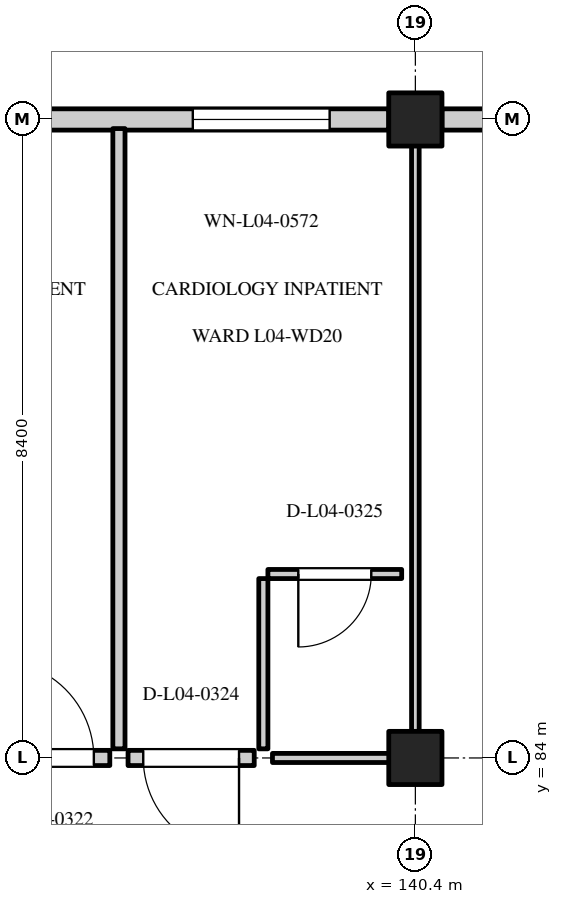
"""IFC4 building model, lengths in metres.
Left out: names, types, materials, properties, quantities, classifications, styles, units other than length and angle.
Written with IfcOpenShell. Run it as: python <this file> out.ifc"""

import sys

from ifc_helpers import new_model, si_unit, direction, frame, frame_2d, origin, origin_2d, place, context, subcontext, project, spatial, rectangle, extrude, element, fill, save


model = new_model("IFC4")
c1 = context("Model", 3, precision=1e-05, world=origin(), true_north=direction((0.0, 1.0)))
c2 = subcontext(c1, "Body", "Model", "MODEL_VIEW")
j1 = project(units=[si_unit("LENGTHUNIT", "METRE"), si_unit("PLANEANGLEUNIT", "RADIAN")], contexts=[c1])
p1 = place(None, origin())
s1 = spatial("IfcSite", under=j1, at=p1, CompositionType="ELEMENT")
p2 = place(p1, origin())
s2 = spatial("IfcBuilding", under=s1, at=p2, CompositionType="ELEMENT")
p3 = place(p2, frame((0.0, 0.0, 18.0)))
s3 = spatial("IfcBuildingStorey", under=s2, at=p3, CompositionType="ELEMENT", Elevation=18.0)
for number, where, z_axis, x_axis in (
    (1, (140.4, 84.0, 0.0), (0.0, 0.0, 1.0), (1.0, 0.0, 0.0)),
    (2, (140.4, 92.4, 0.0), (0.0, 0.0, 1.0), (1.0, 0.0, 0.0)),
):
    element("IfcColumn", number, at=place(p3, frame(where, z_axis=z_axis, x_axis=x_axis)), inside=s3, PredefinedType="COLUMN", context=c2, shape_type="SweptSolid", body=[
        extrude(rectangle(XDim=0.7, YDim=0.7, at=origin_2d()), origin(), (0.0, 0.0, 1.0), 4.2),
    ])
p4 = place(p3, frame((132.95, 92.4, 0.0), z_axis=(0.0, 0.0, 1.0), x_axis=(1.0, 0.0, 0.0)))
e3 = element("IfcWall", 3, at=p4, inside=s3, PredefinedType="STANDARD", context=c2, shape_type="SweptSolid", body=[
    extrude(rectangle(XDim=7.1, YDim=0.28, at=frame_2d((3.55, 0.0))), origin(), (0.0, 0.0, 1.0), 3.335),
])
p5 = place(p4, frame((0.778, 0.0, 0.8)))
e4 = element("IfcOpeningElement", 4, at=p5, cuts=e3, PredefinedType="OPENING", context=c2, shape_type="SweptSolid", body=[
    extrude(rectangle(XDim=1.8, YDim=1.65, at=frame_2d((0.9, 0.825))), frame((0.0, 0.152, 0.0), z_axis=(0.0, -1.0, 0.0), x_axis=(1.0, 0.0, 0.0)), (0.0, 0.0, 1.0), 0.304),
])
p6 = place(p4, frame((4.522, 0.0, 0.8)))
e5 = element("IfcOpeningElement", 5, at=p6, cuts=e3, PredefinedType="OPENING", context=c2, shape_type="SweptSolid", body=[
    extrude(rectangle(XDim=1.8, YDim=1.65, at=frame_2d((0.9, 0.825))), frame((0.0, 0.152, 0.0), z_axis=(0.0, -1.0, 0.0), x_axis=(1.0, 0.0, 0.0)), (0.0, 0.0, 1.0), 0.304),
])
p7 = place(p3, frame((140.75, 92.4, 0.0), z_axis=(0.0, 0.0, 1.0), x_axis=(1.0, 0.0, 0.0)))
e6 = element("IfcWall", 6, at=p7, inside=s3, PredefinedType="STANDARD", context=c2, shape_type="SweptSolid", body=[
    extrude(rectangle(XDim=7.075, YDim=0.28, at=frame_2d((3.538, 0.0))), origin(), (0.0, 0.0, 1.0), 3.335),
])
p8 = place(p7, frame((0.778, 0.0, 0.8)))
e7 = element("IfcOpeningElement", 7, at=p8, cuts=e6, PredefinedType="OPENING", context=c2, shape_type="SweptSolid", body=[
    extrude(rectangle(XDim=1.8, YDim=1.55, at=frame_2d((0.9, 0.775))), frame((0.0, 0.152, 0.0), z_axis=(0.0, -1.0, 0.0), x_axis=(1.0, 0.0, 0.0)), (0.0, 0.0, 1.0), 0.304),
])
p9 = place(p7, frame((4.522, 0.0, 0.8)))
e8 = element("IfcOpeningElement", 8, at=p9, cuts=e6, PredefinedType="OPENING", context=c2, shape_type="SweptSolid", body=[
    extrude(rectangle(XDim=1.8, YDim=1.55, at=frame_2d((0.9, 0.775))), frame((0.0, 0.152, 0.0), z_axis=(0.0, -1.0, 0.0), x_axis=(1.0, 0.0, 0.0)), (0.0, 0.0, 1.0), 0.304),
])
p10 = place(p3, frame((136.5, 84.12, 0.0), z_axis=(0.0, 0.0, 1.0), x_axis=(0.0, 1.0, 0.0)))
e9 = element("IfcWall", 9, at=p10, inside=s3, PredefinedType="PARTITIONING", context=c2, shape_type="SweptSolid", body=[
    extrude(rectangle(XDim=8.16, YDim=0.16, at=frame_2d((4.08, 0.0))), origin(), (0.0, 0.0, 1.0), 3.865),
])
p11 = place(p3, frame((134.72, 84.0, 0.0), z_axis=(0.0, 0.0, 1.0), x_axis=(1.0, 0.0, 0.0)))
e10 = element("IfcWall", 10, at=p11, inside=s3, PredefinedType="STANDARD", context=c2, shape_type="SweptSolid", body=[
    extrude(rectangle(XDim=1.66, YDim=0.2, at=frame_2d((0.83, 0.0))), origin(), (0.0, 0.0, 1.0), 3.235),
])
p12 = place(p11, frame((0.17, 0.0, 0.0)))
e11 = element("IfcOpeningElement", 11, at=p12, cuts=e10, PredefinedType="OPENING", context=c2, shape_type="SweptSolid", body=[
    extrude(rectangle(XDim=1.28, YDim=2.15, at=frame_2d((0.64, 1.075))), frame((0.0, 0.112, 0.0), z_axis=(0.0, -1.0, 0.0), x_axis=(1.0, 0.0, 0.0)), (0.0, 0.0, 1.0), 0.224),
])
p13 = place(p3, frame((140.4, 84.12, 0.0), z_axis=(0.0, 0.0, 1.0), x_axis=(0.0, 1.0, 0.0)))
e12 = element("IfcWall", 12, at=p13, inside=s3, PredefinedType="PARTITIONING", context=c2, shape_type="SweptSolid", body=[
    extrude(rectangle(XDim=8.16, YDim=0.1, at=frame_2d((4.08, 0.0))), origin(), (0.0, 0.0, 1.0), 3.865),
])
p14 = place(p3, frame((136.62, 84.0, 0.0), z_axis=(0.0, 0.0, 1.0), x_axis=(1.0, 0.0, 0.0)))
e13 = element("IfcWall", 13, at=p14, inside=s3, PredefinedType="STANDARD", context=c2, shape_type="SweptSolid", body=[
    extrude(rectangle(XDim=1.66, YDim=0.2, at=frame_2d((0.83, 0.0))), origin(), (0.0, 0.0, 1.0), 3.235),
])
p15 = place(p14, frame((0.2, 0.0, 0.0)))
e14 = element("IfcOpeningElement", 14, at=p15, cuts=e13, PredefinedType="OPENING", context=c2, shape_type="SweptSolid", body=[
    extrude(rectangle(XDim=1.26, YDim=2.1, at=frame_2d((0.63, 1.05))), frame((0.0, 0.112, 0.0), z_axis=(0.0, -1.0, 0.0), x_axis=(1.0, 0.0, 0.0)), (0.0, 0.0, 1.0), 0.224),
])
p16 = place(p3, frame((138.52, 84.0, 0.0), z_axis=(0.0, 0.0, 1.0), x_axis=(1.0, 0.0, 0.0)))
e15 = element("IfcWall", 15, at=p16, inside=s3, PredefinedType="PARTITIONING", context=c2, shape_type="SweptSolid", body=[
    extrude(rectangle(XDim=1.76, YDim=0.12, at=frame_2d((0.88, 0.0))), origin(), (0.0, 0.0, 1.0), 3.235),
])
p17 = place(p3, frame((138.4, 84.12, 0.0), z_axis=(0.0, 0.0, 1.0), x_axis=(0.0, 1.0, 0.0)))
e16 = element("IfcWall", 16, at=p17, inside=s3, PredefinedType="PARTITIONING", context=c2, shape_type="SweptSolid", body=[
    extrude(rectangle(XDim=2.24, YDim=0.12, at=frame_2d((1.12, 0.0))), origin(), (0.0, 0.0, 1.0), 3.865),
])
p18 = place(p3, frame((138.46, 86.42, 0.0), z_axis=(0.0, 0.0, 1.0), x_axis=(1.0, 0.0, 0.0)))
e17 = element("IfcWall", 17, at=p18, inside=s3, PredefinedType="PARTITIONING", context=c2, shape_type="SweptSolid", body=[
    extrude(rectangle(XDim=1.76, YDim=0.12, at=frame_2d((0.88, 0.0))), origin(), (0.0, 0.0, 1.0), 3.865),
])
p19 = place(p18, frame((0.4, 0.0, 0.0)))
e18 = element("IfcOpeningElement", 18, at=p19, cuts=e17, PredefinedType="OPENING", context=c2, shape_type="SweptSolid", body=[
    extrude(rectangle(XDim=0.96, YDim=2.12, at=frame_2d((0.48, 1.06))), frame((0.0, 0.072, 0.0), z_axis=(0.0, -1.0, 0.0), x_axis=(1.0, 0.0, 0.0)), (0.0, 0.0, 1.0), 0.144),
])
p20 = place(p6, origin())
e19 = element("IfcWindow", 19, at=p20, inside=s3, PartitioningType="DOUBLE_PANEL_VERTICAL", PredefinedType="WINDOW", context=c2, shape_type="SweptSolid", body=[
    extrude(rectangle(XDim=1.8, YDim=1.65, at=frame_2d((0.9, 0.825))), frame((0.0, 0.03, 0.0), z_axis=(0.0, -1.0, 0.0), x_axis=(1.0, 0.0, 0.0)), (0.0, 0.0, 1.0), 0.06),
])
fill(e5, e19)
p21 = place(p12, origin())
e20 = element("IfcDoor", 20, at=p21, inside=s3, OperationType="SINGLE_SWING_LEFT", PredefinedType="DOOR", context=c2, shape_type="SweptSolid", body=[
    extrude(rectangle(XDim=1.28, YDim=2.15, at=frame_2d((0.64, 1.075))), frame((0.0, 0.025, 0.0), z_axis=(0.0, -1.0, 0.0), x_axis=(1.0, 0.0, 0.0)), (0.0, 0.0, 1.0), 0.05),
])
fill(e11, e20)
p22 = place(p15, origin())
e21 = element("IfcDoor", 21, at=p22, inside=s3, OperationType="SINGLE_SWING_RIGHT", PredefinedType="DOOR", context=c2, shape_type="SweptSolid", body=[
    extrude(rectangle(XDim=1.26, YDim=2.1, at=frame_2d((0.63, 1.05))), frame((0.0, 0.025, 0.0), z_axis=(0.0, -1.0, 0.0), x_axis=(1.0, 0.0, 0.0)), (0.0, 0.0, 1.0), 0.05),
])
fill(e14, e21)
p23 = place(p19, frame((0.96, 0.0, 0.0), z_axis=(0.0, 0.0, 1.0), x_axis=(-1.0, 0.0, 0.0)))
e22 = element("IfcDoor", 22, at=p23, inside=s3, OperationType="SINGLE_SWING_RIGHT", PredefinedType="DOOR", context=c2, shape_type="SweptSolid", body=[
    extrude(rectangle(XDim=0.96, YDim=2.12, at=frame_2d((0.48, 1.06))), frame((0.0, 0.025, 0.0), z_axis=(0.0, -1.0, 0.0), x_axis=(1.0, 0.0, 0.0)), (0.0, 0.0, 1.0), 0.05),
])
fill(e18, e22)
save(model, sys.argv[1])
